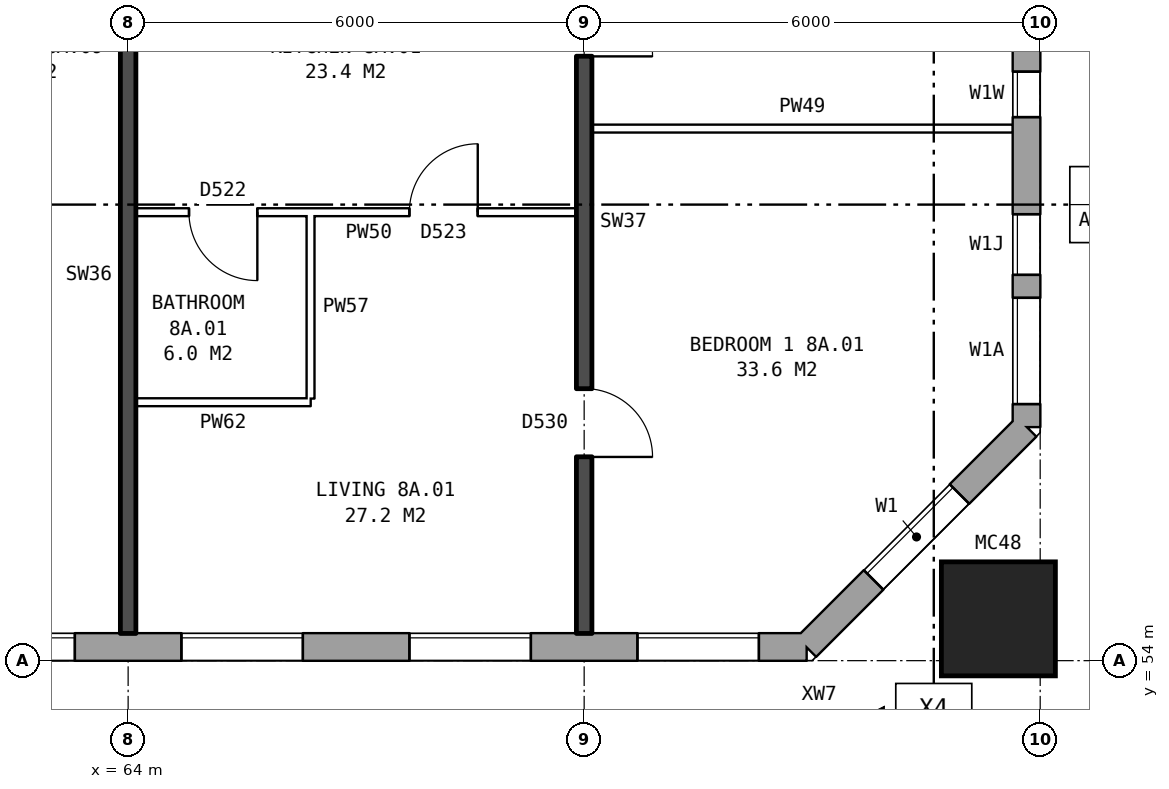
"""IFC4 building model, lengths in metres.
Left out: names, types, materials, properties, quantities, classifications, styles, units other than length and angle.
Written with IfcOpenShell. Run it as: python <this file> out.ifc"""

import sys

from ifc_helpers import new_model, si_unit, direction, frame, frame_2d, origin, origin_2d, place, context, subcontext, project, spatial, rectangle, hollow_rectangle, extrude, element, fill, save


model = new_model("IFC4")
c1 = context("Model", 3, precision=1e-05, world=origin(), true_north=direction((0.0, 1.0)))
c2 = subcontext(c1, "Body", "Model", "MODEL_VIEW")
j1 = project(units=[si_unit("LENGTHUNIT", "METRE"), si_unit("PLANEANGLEUNIT", "RADIAN")], contexts=[c1])
p1 = place(None, origin())
s1 = spatial("IfcSite", under=j1, at=p1, CompositionType="ELEMENT")
p2 = place(p1, origin())
s2 = spatial("IfcBuilding", under=s1, at=p2, CompositionType="ELEMENT")
p3 = place(p2, frame((0.0, 0.0, 31.9)))
s3 = spatial("IfcBuildingStorey", under=s2, at=p3, CompositionType="ELEMENT", Elevation=31.9)
p4 = place(p3, frame((75.45, 54.55, 0.0), z_axis=(0.0, 0.0, 1.0), x_axis=(1.0, 0.0, 0.0)))
e1 = element("IfcColumn", 1, at=p4, inside=s3, PredefinedType="COLUMN", context=c2, shape_type="SweptSolid", body=[
    extrude(hollow_rectangle(XDim=1.5, YDim=1.5, WallThickness=0.08, at=origin_2d()), origin(), (0.0, 0.0, 1.0), 3.1),
])
p5 = place(p3, frame((22.825, 54.18, 0.0), z_axis=(0.0, 0.0, 1.0), x_axis=(1.0, 0.0, 0.0)))
e2 = element("IfcWall", 2, at=p5, inside=s3, PredefinedType="STANDARD", context=c2, shape_type="SweptSolid", body=[
    extrude(rectangle(XDim=50.101, YDim=0.36, at=frame_2d((25.05, 0.0))), origin(), (0.0, 0.0, 1.0), 2.85),
])
p6 = place(p5, frame((2.875, 0.0, 0.8)))
e3 = element("IfcOpeningElement", 3, at=p6, cuts=e2, PredefinedType="OPENING", context=c2, shape_type="SweptSolid", body=[
    extrude(rectangle(XDim=1.6, YDim=1.8, at=frame_2d((0.8, 0.9))), frame((0.0, 0.19, 0.0), z_axis=(0.0, -1.0, 0.0), x_axis=(1.0, 0.0, 0.0)), (0.0, 0.0, 1.0), 0.38),
])
p7 = place(p5, frame((5.875, 0.0, 0.8)))
e4 = element("IfcOpeningElement", 4, at=p7, cuts=e2, PredefinedType="OPENING", context=c2, shape_type="SweptSolid", body=[
    extrude(rectangle(XDim=1.6, YDim=1.8, at=frame_2d((0.8, 0.9))), frame((0.0, 0.19, 0.0), z_axis=(0.0, -1.0, 0.0), x_axis=(1.0, 0.0, 0.0)), (0.0, 0.0, 1.0), 0.38),
])
p8 = place(p5, frame((8.875, 0.0, 0.8)))
e5 = element("IfcOpeningElement", 5, at=p8, cuts=e2, PredefinedType="OPENING", context=c2, shape_type="SweptSolid", body=[
    extrude(rectangle(XDim=1.6, YDim=1.8, at=frame_2d((0.8, 0.9))), frame((0.0, 0.19, 0.0), z_axis=(0.0, -1.0, 0.0), x_axis=(1.0, 0.0, 0.0)), (0.0, 0.0, 1.0), 0.38),
])
p9 = place(p5, frame((11.875, 0.0, 0.8)))
e6 = element("IfcOpeningElement", 6, at=p9, cuts=e2, PredefinedType="OPENING", context=c2, shape_type="SweptSolid", body=[
    extrude(rectangle(XDim=1.6, YDim=1.8, at=frame_2d((0.8, 0.9))), frame((0.0, 0.19, 0.0), z_axis=(0.0, -1.0, 0.0), x_axis=(1.0, 0.0, 0.0)), (0.0, 0.0, 1.0), 0.38),
])
p10 = place(p5, frame((14.875, 0.0, 0.8)))
e7 = element("IfcOpeningElement", 7, at=p10, cuts=e2, PredefinedType="OPENING", context=c2, shape_type="SweptSolid", body=[
    extrude(rectangle(XDim=1.6, YDim=1.8, at=frame_2d((0.8, 0.9))), frame((0.0, 0.19, 0.0), z_axis=(0.0, -1.0, 0.0), x_axis=(1.0, 0.0, 0.0)), (0.0, 0.0, 1.0), 0.38),
])
p11 = place(p5, frame((17.375, 0.0, 1.6)))
e8 = element("IfcOpeningElement", 8, at=p11, cuts=e2, PredefinedType="OPENING", context=c2, shape_type="SweptSolid", body=[
    extrude(rectangle(XDim=0.6, YDim=0.9, at=frame_2d((0.3, 0.45))), frame((0.0, 0.19, 0.0), z_axis=(0.0, -1.0, 0.0), x_axis=(1.0, 0.0, 0.0)), (0.0, 0.0, 1.0), 0.38),
])
p12 = place(p5, frame((20.875, 0.0, 0.8)))
e9 = element("IfcOpeningElement", 9, at=p12, cuts=e2, PredefinedType="OPENING", context=c2, shape_type="SweptSolid", body=[
    extrude(rectangle(XDim=1.6, YDim=1.8, at=frame_2d((0.8, 0.9))), frame((0.0, 0.19, 0.0), z_axis=(0.0, -1.0, 0.0), x_axis=(1.0, 0.0, 0.0)), (0.0, 0.0, 1.0), 0.38),
])
p13 = place(p5, frame((23.875, 0.0, 0.8)))
e10 = element("IfcOpeningElement", 10, at=p13, cuts=e2, PredefinedType="OPENING", context=c2, shape_type="SweptSolid", body=[
    extrude(rectangle(XDim=1.6, YDim=1.8, at=frame_2d((0.8, 0.9))), frame((0.0, 0.19, 0.0), z_axis=(0.0, -1.0, 0.0), x_axis=(1.0, 0.0, 0.0)), (0.0, 0.0, 1.0), 0.38),
])
p14 = place(p5, frame((26.875, 0.0, 0.8)))
e11 = element("IfcOpeningElement", 11, at=p14, cuts=e2, PredefinedType="OPENING", context=c2, shape_type="SweptSolid", body=[
    extrude(rectangle(XDim=1.6, YDim=1.8, at=frame_2d((0.8, 0.9))), frame((0.0, 0.19, 0.0), z_axis=(0.0, -1.0, 0.0), x_axis=(1.0, 0.0, 0.0)), (0.0, 0.0, 1.0), 0.38),
])
p15 = place(p5, frame((29.375, 0.0, 0.15)))
e12 = element("IfcOpeningElement", 12, at=p15, cuts=e2, PredefinedType="OPENING", context=c2, shape_type="SweptSolid", body=[
    extrude(rectangle(XDim=0.8, YDim=1.8, at=frame_2d((0.4, 0.9))), frame((0.0, 0.19, 0.0), z_axis=(0.0, -1.0, 0.0), x_axis=(1.0, 0.0, 0.0)), (0.0, 0.0, 1.0), 0.38),
])
p16 = place(p5, frame((32.425, 0.0, 1.4)))
e13 = element("IfcOpeningElement", 13, at=p16, cuts=e2, PredefinedType="OPENING", context=c2, shape_type="SweptSolid", body=[
    extrude(rectangle(XDim=0.6, YDim=1.2, at=frame_2d((0.3, 0.6))), frame((0.0, 0.19, 0.0), z_axis=(0.0, -1.0, 0.0), x_axis=(1.0, 0.0, 0.0)), (0.0, 0.0, 1.0), 0.38),
])
p17 = place(p5, frame((35.875, 0.0, 0.8)))
e14 = element("IfcOpeningElement", 14, at=p17, cuts=e2, PredefinedType="OPENING", context=c2, shape_type="SweptSolid", body=[
    extrude(rectangle(XDim=1.6, YDim=1.8, at=frame_2d((0.8, 0.9))), frame((0.0, 0.19, 0.0), z_axis=(0.0, -1.0, 0.0), x_axis=(1.0, 0.0, 0.0)), (0.0, 0.0, 1.0), 0.38),
])
p18 = place(p5, frame((38.875, 0.0, 0.8)))
e15 = element("IfcOpeningElement", 15, at=p18, cuts=e2, PredefinedType="OPENING", context=c2, shape_type="SweptSolid", body=[
    extrude(rectangle(XDim=1.6, YDim=1.8, at=frame_2d((0.8, 0.9))), frame((0.0, 0.19, 0.0), z_axis=(0.0, -1.0, 0.0), x_axis=(1.0, 0.0, 0.0)), (0.0, 0.0, 1.0), 0.38),
])
p19 = place(p5, frame((41.875, 0.0, 0.8)))
e16 = element("IfcOpeningElement", 16, at=p19, cuts=e2, PredefinedType="OPENING", context=c2, shape_type="SweptSolid", body=[
    extrude(rectangle(XDim=1.6, YDim=1.8, at=frame_2d((0.8, 0.9))), frame((0.0, 0.19, 0.0), z_axis=(0.0, -1.0, 0.0), x_axis=(1.0, 0.0, 0.0)), (0.0, 0.0, 1.0), 0.38),
])
p20 = place(p5, frame((44.875, 0.0, 0.8)))
e17 = element("IfcOpeningElement", 17, at=p20, cuts=e2, PredefinedType="OPENING", context=c2, shape_type="SweptSolid", body=[
    extrude(rectangle(XDim=1.6, YDim=1.8, at=frame_2d((0.8, 0.9))), frame((0.0, 0.19, 0.0), z_axis=(0.0, -1.0, 0.0), x_axis=(1.0, 0.0, 0.0)), (0.0, 0.0, 1.0), 0.38),
])
p21 = place(p5, frame((47.875, 0.0, 0.8)))
e18 = element("IfcOpeningElement", 18, at=p21, cuts=e2, PredefinedType="OPENING", context=c2, shape_type="SweptSolid", body=[
    extrude(rectangle(XDim=1.6, YDim=1.8, at=frame_2d((0.8, 0.9))), frame((0.0, 0.19, 0.0), z_axis=(0.0, -1.0, 0.0), x_axis=(1.0, 0.0, 0.0)), (0.0, 0.0, 1.0), 0.38),
])
p22 = place(p5, frame((19.525, 0.0, 0.8)))
e19 = element("IfcOpeningElement", 19, at=p22, cuts=e2, PredefinedType="OPENING", context=c2, shape_type="SweptSolid", body=[
    extrude(rectangle(XDim=1.0, YDim=0.9, at=frame_2d((0.5, 0.45))), frame((0.0, 0.19, 0.0), z_axis=(0.0, -1.0, 0.0), x_axis=(1.0, 0.0, 0.0)), (0.0, 0.0, 1.0), 0.38),
])
p23 = place(p5, frame((30.475, 0.0, 0.15)))
e20 = element("IfcOpeningElement", 20, at=p23, cuts=e2, PredefinedType="OPENING", context=c2, shape_type="SweptSolid", body=[
    extrude(rectangle(XDim=1.0, YDim=0.9, at=frame_2d((0.5, 0.45))), frame((0.0, 0.19, 0.0), z_axis=(0.0, -1.0, 0.0), x_axis=(1.0, 0.0, 0.0)), (0.0, 0.0, 1.0), 0.38),
])
p24 = place(p5, frame((33.325, 0.0, 0.8)))
e21 = element("IfcOpeningElement", 21, at=p24, cuts=e2, PredefinedType="OPENING", context=c2, shape_type="SweptSolid", body=[
    extrude(rectangle(XDim=1.6, YDim=1.8, at=frame_2d((0.8, 0.9))), frame((0.0, 0.19, 0.0), z_axis=(0.0, -1.0, 0.0), x_axis=(1.0, 0.0, 0.0)), (0.0, 0.0, 1.0), 0.38),
])
p25 = place(p3, frame((72.925, 54.18, 0.0), z_axis=(0.0, 0.0, 1.0), x_axis=(0.707106781187, 0.707106781187, 0.0)))
e22 = element("IfcWall", 22, at=p25, inside=s3, PredefinedType="STANDARD", context=c2, shape_type="SweptSolid", body=[
    extrude(rectangle(XDim=4.094, YDim=0.36, at=frame_2d((2.047, 0.0))), origin(), (0.0, 0.0, 1.0), 2.85),
])
p26 = place(p25, frame((1.247, 0.0, 0.8)))
e23 = element("IfcOpeningElement", 23, at=p26, cuts=e22, PredefinedType="OPENING", context=c2, shape_type="SweptSolid", body=[
    extrude(rectangle(XDim=1.6, YDim=1.8, at=frame_2d((0.8, 0.9))), frame((0.0, 0.19, 0.0), z_axis=(0.0, -1.0, 0.0), x_axis=(1.0, 0.0, 0.0)), (0.0, 0.0, 1.0), 0.38),
])
p27 = place(p3, frame((75.82, 57.075, 0.0), z_axis=(0.0, 0.0, 1.0), x_axis=(0.0, 1.0, 0.0)))
e24 = element("IfcWall", 24, at=p27, inside=s3, PredefinedType="STANDARD", context=c2, shape_type="SweptSolid", body=[
    extrude(rectangle(XDim=25.851, YDim=0.36, at=frame_2d((12.925, 0.0))), origin(), (0.0, 0.0, 1.0), 2.85),
])
p28 = place(p27, frame((0.3, 0.0, 0.8)))
e25 = element("IfcOpeningElement", 25, at=p28, cuts=e24, PredefinedType="OPENING", context=c2, shape_type="SweptSolid", body=[
    extrude(rectangle(XDim=1.4, YDim=1.8, at=frame_2d((0.7, 0.9))), frame((0.0, 0.19, 0.0), z_axis=(0.0, -1.0, 0.0), x_axis=(1.0, 0.0, 0.0)), (0.0, 0.0, 1.0), 0.38),
])
p29 = place(p27, frame((4.075, 0.0, 0.25)))
e26 = element("IfcOpeningElement", 26, at=p29, cuts=e24, PredefinedType="OPENING", context=c2, shape_type="SweptSolid", body=[
    extrude(rectangle(XDim=0.6, YDim=0.9, at=frame_2d((0.3, 0.45))), frame((0.0, 0.19, 0.0), z_axis=(0.0, -1.0, 0.0), x_axis=(1.0, 0.0, 0.0)), (0.0, 0.0, 1.0), 0.38),
])
p30 = place(p27, frame((19.225, 0.0, 1.65)))
e27 = element("IfcOpeningElement", 27, at=p30, cuts=e24, PredefinedType="OPENING", context=c2, shape_type="SweptSolid", body=[
    extrude(rectangle(XDim=1.4, YDim=0.9, at=frame_2d((0.7, 0.45))), frame((0.0, 0.19, 0.0), z_axis=(0.0, -1.0, 0.0), x_axis=(1.0, 0.0, 0.0)), (0.0, 0.0, 1.0), 0.38),
])
p31 = place(p27, frame((22.525, 0.0, 0.8)))
e28 = element("IfcOpeningElement", 28, at=p31, cuts=e24, PredefinedType="OPENING", context=c2, shape_type="SweptSolid", body=[
    extrude(rectangle(XDim=1.0, YDim=1.2, at=frame_2d((0.5, 0.6))), frame((0.0, 0.19, 0.0), z_axis=(0.0, -1.0, 0.0), x_axis=(1.0, 0.0, 0.0)), (0.0, 0.0, 1.0), 0.38),
])
p32 = place(p27, frame((2.0, 0.0, 0.8)))
e29 = element("IfcOpeningElement", 29, at=p32, cuts=e24, PredefinedType="OPENING", context=c2, shape_type="SweptSolid", body=[
    extrude(rectangle(XDim=0.8, YDim=1.5, at=frame_2d((0.4, 0.75))), frame((0.0, 0.19, 0.0), z_axis=(0.0, -1.0, 0.0), x_axis=(1.0, 0.0, 0.0)), (0.0, 0.0, 1.0), 0.38),
])
p33 = place(p27, frame((5.125, 0.0, 1.65)))
e30 = element("IfcOpeningElement", 30, at=p33, cuts=e24, PredefinedType="OPENING", context=c2, shape_type="SweptSolid", body=[
    extrude(rectangle(XDim=1.4, YDim=0.9, at=frame_2d((0.7, 0.45))), frame((0.0, 0.19, 0.0), z_axis=(0.0, -1.0, 0.0), x_axis=(1.0, 0.0, 0.0)), (0.0, 0.0, 1.0), 0.38),
])
p34 = place(p27, frame((21.075, 0.0, 0.25)))
e31 = element("IfcOpeningElement", 31, at=p34, cuts=e24, PredefinedType="OPENING", context=c2, shape_type="SweptSolid", body=[
    extrude(rectangle(XDim=0.6, YDim=0.9, at=frame_2d((0.3, 0.45))), frame((0.0, 0.19, 0.0), z_axis=(0.0, -1.0, 0.0), x_axis=(1.0, 0.0, 0.0)), (0.0, 0.0, 1.0), 0.38),
])
p35 = place(p27, frame((23.825, 0.0, 0.8)))
e32 = element("IfcOpeningElement", 32, at=p35, cuts=e24, PredefinedType="OPENING", context=c2, shape_type="SweptSolid", body=[
    extrude(rectangle(XDim=1.4, YDim=1.8, at=frame_2d((0.7, 0.9))), frame((0.0, 0.19, 0.0), z_axis=(0.0, -1.0, 0.0), x_axis=(1.0, 0.0, 0.0)), (0.0, 0.0, 1.0), 0.38),
])
p36 = place(p3, frame((64.1, 57.4, 0.0), z_axis=(0.0, 0.0, 1.0), x_axis=(1.0, 0.0, 0.0)))
e33 = element("IfcWall", 33, at=p36, inside=s3, PredefinedType="PARTITIONING", context=c2, shape_type="SweptSolid", body=[
    extrude(rectangle(XDim=2.3, YDim=0.1, at=frame_2d((1.15, 0.0))), origin(), (0.0, 0.0, 1.0), 2.85),
])
p37 = place(p3, frame((64.1, 59.9, 0.0), z_axis=(0.0, 0.0, 1.0), x_axis=(1.0, 0.0, 0.0)))
e34 = element("IfcWall", 34, at=p37, inside=s3, PredefinedType="PARTITIONING", context=c2, shape_type="SweptSolid", body=[
    extrude(rectangle(XDim=5.8, YDim=0.1, at=frame_2d((2.9, 0.0))), origin(), (0.0, 0.0, 1.0), 2.85),
])
p38 = place(p37, frame((3.6, 0.0, 0.0)))
e35 = element("IfcOpeningElement", 35, at=p38, cuts=e34, PredefinedType="OPENING", context=c2, shape_type="SweptSolid", body=[
    extrude(rectangle(XDim=0.9, YDim=2.1, at=frame_2d((0.45, 1.05))), frame((0.0, 0.06, 0.0), z_axis=(0.0, -1.0, 0.0), x_axis=(1.0, 0.0, 0.0)), (0.0, 0.0, 1.0), 0.12),
])
p39 = place(p37, frame((0.7, 0.0, 0.0)))
e36 = element("IfcOpeningElement", 36, at=p39, cuts=e34, PredefinedType="OPENING", context=c2, shape_type="SweptSolid", body=[
    extrude(rectangle(XDim=0.9, YDim=2.1, at=frame_2d((0.45, 1.05))), frame((0.0, 0.06, 0.0), z_axis=(0.0, -1.0, 0.0), x_axis=(1.0, 0.0, 0.0)), (0.0, 0.0, 1.0), 0.12),
])
p40 = place(p3, frame((70.1, 61.0, 0.0), z_axis=(0.0, 0.0, 1.0), x_axis=(1.0, 0.0, 0.0)))
e37 = element("IfcWall", 37, at=p40, inside=s3, PredefinedType="PARTITIONING", context=c2, shape_type="SweptSolid", body=[
    extrude(rectangle(XDim=5.54, YDim=0.1, at=frame_2d((2.77, 0.0))), origin(), (0.0, 0.0, 1.0), 2.85),
])
p41 = place(p3, frame((64.0, 54.36, 0.0), z_axis=(0.0, 0.0, 1.0), x_axis=(0.0, 1.0, 0.0)))
e38 = element("IfcWall", 38, at=p41, inside=s3, PredefinedType="SOLIDWALL", context=c2, shape_type="SweptSolid", body=[
    extrude(rectangle(XDim=9.44, YDim=0.2, at=frame_2d((4.72, 0.0))), origin(), (0.0, 0.0, 1.0), 2.85),
])
p42 = place(p3, frame((66.4, 57.45, 0.0), z_axis=(0.0, 0.0, 1.0), x_axis=(0.0, 1.0, 0.0)))
e39 = element("IfcWall", 39, at=p42, inside=s3, PredefinedType="PARTITIONING", context=c2, shape_type="SweptSolid", body=[
    extrude(rectangle(XDim=2.4, YDim=0.1, at=frame_2d((1.2, 0.0))), origin(), (0.0, 0.0, 1.0), 2.85),
])
p43 = place(p3, frame((70.0, 54.36, 0.0), z_axis=(0.0, 0.0, 1.0), x_axis=(0.0, 1.0, 0.0)))
e40 = element("IfcWall", 40, at=p43, inside=s3, PredefinedType="SOLIDWALL", context=c2, shape_type="SweptSolid", body=[
    extrude(rectangle(XDim=9.44, YDim=0.2, at=frame_2d((4.72, 0.0))), origin(), (0.0, 0.0, 1.0), 2.85),
])
p44 = place(p43, frame((2.32, 0.0, 0.0)))
e41 = element("IfcOpeningElement", 41, at=p44, cuts=e40, PredefinedType="OPENING", context=c2, shape_type="SweptSolid", body=[
    extrude(rectangle(XDim=0.9, YDim=2.1, at=frame_2d((0.45, 1.05))), frame((0.0, 0.11, 0.0), z_axis=(0.0, -1.0, 0.0), x_axis=(1.0, 0.0, 0.0)), (0.0, 0.0, 1.0), 0.22),
])
p45 = place(p43, frame((7.59, 0.0, 0.0)))
e42 = element("IfcOpeningElement", 42, at=p45, cuts=e40, PredefinedType="OPENING", context=c2, shape_type="SweptSolid", body=[
    extrude(rectangle(XDim=0.9, YDim=2.1, at=frame_2d((0.45, 1.05))), frame((0.0, 0.11, 0.0), z_axis=(0.0, -1.0, 0.0), x_axis=(1.0, 0.0, 0.0)), (0.0, 0.0, 1.0), 0.22),
])
p46 = place(p18, origin())
e43 = element("IfcWindow", 43, at=p46, inside=s3, PartitioningType="SINGLE_PANEL", PredefinedType="WINDOW", context=c2, shape_type="SweptSolid", body=[
    extrude(rectangle(XDim=1.6, YDim=1.8, at=frame_2d((0.8, 0.9))), frame((0.0, 0.15, 0.0), z_axis=(0.0, -1.0, 0.0), x_axis=(1.0, 0.0, 0.0)), (0.0, 0.0, 1.0), 0.06),
])
fill(e15, e43)
p47 = place(p19, origin())
e44 = element("IfcWindow", 44, at=p47, inside=s3, PartitioningType="SINGLE_PANEL", PredefinedType="WINDOW", context=c2, shape_type="SweptSolid", body=[
    extrude(rectangle(XDim=1.6, YDim=1.8, at=frame_2d((0.8, 0.9))), frame((0.0, 0.15, 0.0), z_axis=(0.0, -1.0, 0.0), x_axis=(1.0, 0.0, 0.0)), (0.0, 0.0, 1.0), 0.06),
])
fill(e16, e44)
p48 = place(p20, origin())
e45 = element("IfcWindow", 45, at=p48, inside=s3, PartitioningType="SINGLE_PANEL", PredefinedType="WINDOW", context=c2, shape_type="SweptSolid", body=[
    extrude(rectangle(XDim=1.6, YDim=1.8, at=frame_2d((0.8, 0.9))), frame((0.0, 0.15, 0.0), z_axis=(0.0, -1.0, 0.0), x_axis=(1.0, 0.0, 0.0)), (0.0, 0.0, 1.0), 0.06),
])
fill(e17, e45)
p49 = place(p21, origin())
e46 = element("IfcWindow", 46, at=p49, inside=s3, PartitioningType="SINGLE_PANEL", PredefinedType="WINDOW", context=c2, shape_type="SweptSolid", body=[
    extrude(rectangle(XDim=1.6, YDim=1.8, at=frame_2d((0.8, 0.9))), frame((0.0, 0.15, 0.0), z_axis=(0.0, -1.0, 0.0), x_axis=(1.0, 0.0, 0.0)), (0.0, 0.0, 1.0), 0.06),
])
fill(e18, e46)
p50 = place(p26, origin())
e47 = element("IfcWindow", 47, at=p50, inside=s3, PartitioningType="SINGLE_PANEL", PredefinedType="WINDOW", context=c2, shape_type="SweptSolid", body=[
    extrude(rectangle(XDim=1.6, YDim=1.8, at=frame_2d((0.8, 0.9))), frame((0.0, 0.15, 0.0), z_axis=(0.0, -1.0, 0.0), x_axis=(1.0, 0.0, 0.0)), (0.0, 0.0, 1.0), 0.06),
])
fill(e23, e47)
p51 = place(p28, origin())
e48 = element("IfcWindow", 48, at=p51, inside=s3, PartitioningType="SINGLE_PANEL", PredefinedType="WINDOW", context=c2, shape_type="SweptSolid", body=[
    extrude(rectangle(XDim=1.4, YDim=1.8, at=frame_2d((0.7, 0.9))), frame((0.0, 0.15, 0.0), z_axis=(0.0, -1.0, 0.0), x_axis=(1.0, 0.0, 0.0)), (0.0, 0.0, 1.0), 0.06),
])
fill(e25, e48)
p52 = place(p29, origin())
e49 = element("IfcWindow", 49, at=p52, inside=s3, PartitioningType="SINGLE_PANEL", PredefinedType="WINDOW", context=c2, shape_type="SweptSolid", body=[
    extrude(rectangle(XDim=0.6, YDim=0.9, at=frame_2d((0.3, 0.45))), frame((0.0, 0.15, 0.0), z_axis=(0.0, -1.0, 0.0), x_axis=(1.0, 0.0, 0.0)), (0.0, 0.0, 1.0), 0.06),
])
fill(e26, e49)
p53 = place(p44, frame((0.9, 0.0, 0.0), z_axis=(0.0, 0.0, 1.0), x_axis=(-1.0, 0.0, 0.0)))
e50 = element("IfcDoor", 50, at=p53, inside=s3, OperationType="SINGLE_SWING_RIGHT", PredefinedType="DOOR", context=c2, shape_type="SweptSolid", body=[
    extrude(rectangle(XDim=0.9, YDim=2.1, at=frame_2d((0.45, 1.05))), frame((0.0, 0.025, 0.0), z_axis=(0.0, -1.0, 0.0), x_axis=(1.0, 0.0, 0.0)), (0.0, 0.0, 1.0), 0.05),
])
fill(e41, e50)
p54 = place(p45, frame((0.9, 0.0, 0.0), z_axis=(0.0, 0.0, 1.0), x_axis=(-1.0, 0.0, 0.0)))
e51 = element("IfcDoor", 51, at=p54, inside=s3, OperationType="SINGLE_SWING_RIGHT", PredefinedType="DOOR", context=c2, shape_type="SweptSolid", body=[
    extrude(rectangle(XDim=0.9, YDim=2.1, at=frame_2d((0.45, 1.05))), frame((0.0, 0.025, 0.0), z_axis=(0.0, -1.0, 0.0), x_axis=(1.0, 0.0, 0.0)), (0.0, 0.0, 1.0), 0.05),
])
fill(e42, e51)
p55 = place(p38, origin())
e52 = element("IfcDoor", 52, at=p55, inside=s3, OperationType="SINGLE_SWING_RIGHT", PredefinedType="DOOR", context=c2, shape_type="SweptSolid", body=[
    extrude(rectangle(XDim=0.9, YDim=2.1, at=frame_2d((0.45, 1.05))), frame((0.0, 0.025, 0.0), z_axis=(0.0, -1.0, 0.0), x_axis=(1.0, 0.0, 0.0)), (0.0, 0.0, 1.0), 0.05),
])
fill(e35, e52)
p56 = place(p39, frame((0.9, 0.0, 0.0), z_axis=(0.0, 0.0, 1.0), x_axis=(-1.0, 0.0, 0.0)))
e53 = element("IfcDoor", 53, at=p56, inside=s3, OperationType="SINGLE_SWING_LEFT", PredefinedType="DOOR", context=c2, shape_type="SweptSolid", body=[
    extrude(rectangle(XDim=0.9, YDim=2.1, at=frame_2d((0.45, 1.05))), frame((0.0, 0.025, 0.0), z_axis=(0.0, -1.0, 0.0), x_axis=(1.0, 0.0, 0.0)), (0.0, 0.0, 1.0), 0.05),
])
fill(e36, e53)
p57 = place(p32, origin())
e54 = element("IfcWindow", 54, at=p57, inside=s3, PartitioningType="SINGLE_PANEL", PredefinedType="WINDOW", context=c2, shape_type="SweptSolid", body=[
    extrude(rectangle(XDim=0.8, YDim=1.5, at=frame_2d((0.4, 0.75))), frame((0.0, 0.15, 0.0), z_axis=(0.0, -1.0, 0.0), x_axis=(1.0, 0.0, 0.0)), (0.0, 0.0, 1.0), 0.06),
])
fill(e29, e54)
save(model, sys.argv[1])
